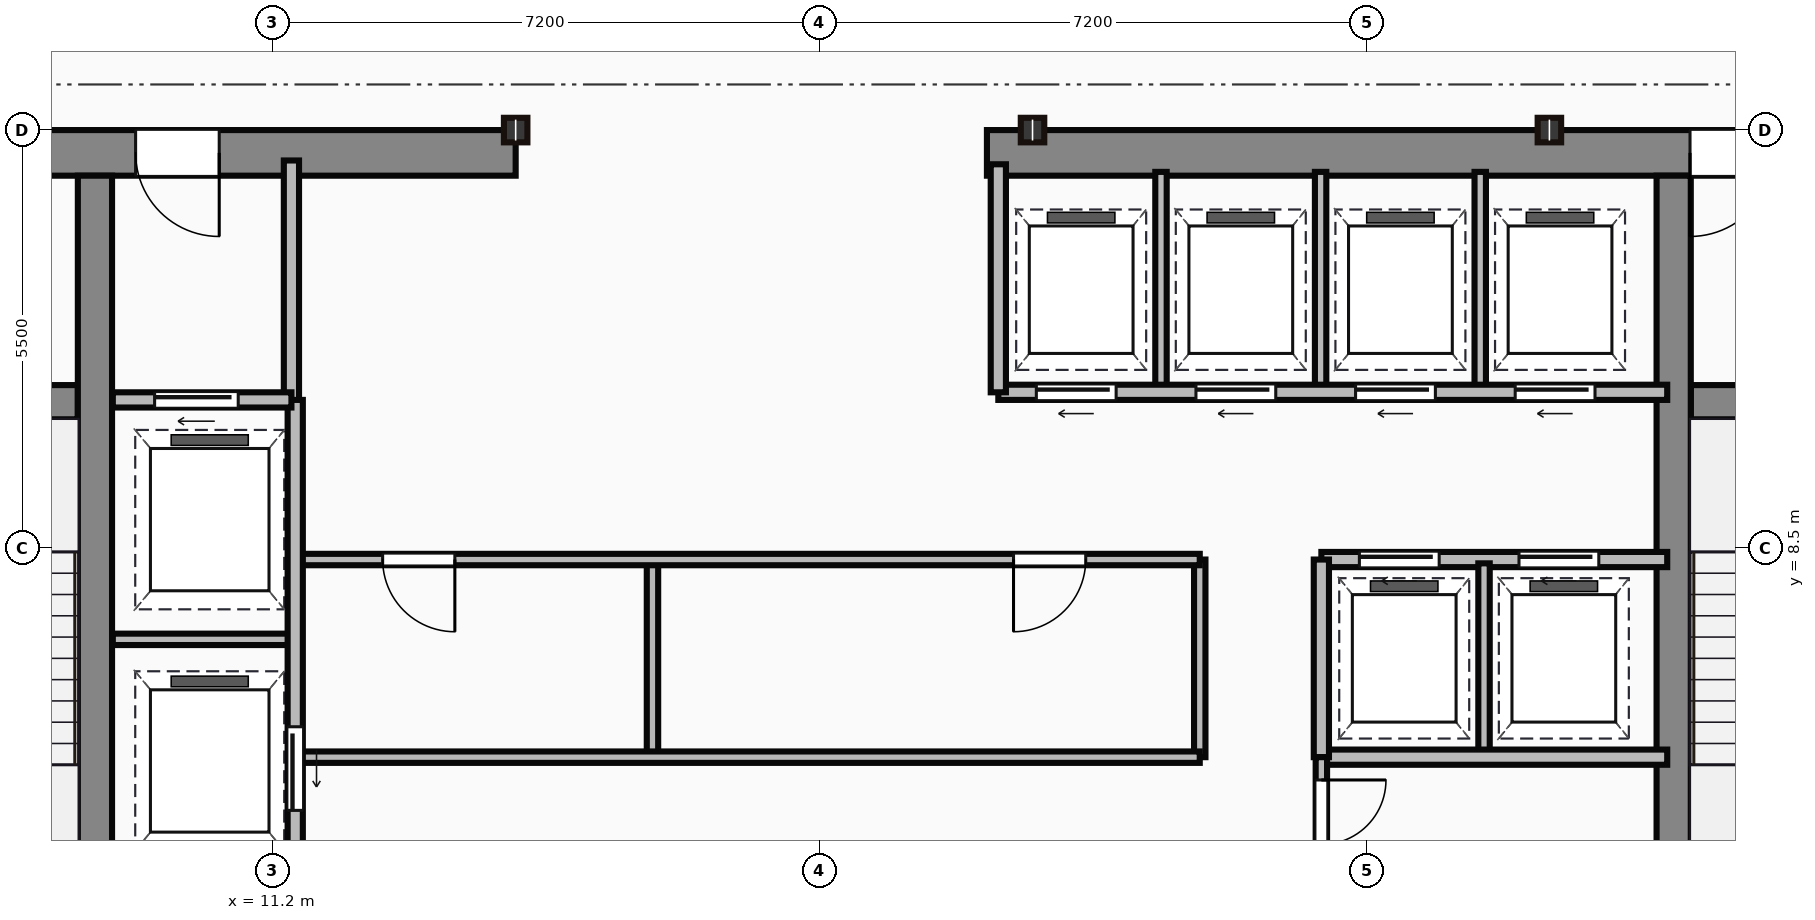
"""IFC4 building model, lengths in metres.
Left out: names, types, materials, properties, quantities, classifications, styles, units other than length and angle.
Written with IfcOpenShell. Run it as: python <this file> out.ifc"""

import sys

from ifc_helpers import new_model, si_unit, direction, frame, frame_2d, origin, origin_2d, place, context, subcontext, project, spatial, rectangle, i_section, extrude, source, transform, mapped, element, fill, save


model = new_model("IFC4")
c1 = context("Model", 3, precision=1e-05, world=origin(), true_north=direction((0.0, 1.0)))
c2 = subcontext(c1, "Body", "Model", "MODEL_VIEW")
j1 = project(units=[si_unit("LENGTHUNIT", "METRE"), si_unit("PLANEANGLEUNIT", "RADIAN")], contexts=[c1])
p1 = place(None, origin())
s1 = spatial("IfcSite", under=j1, at=p1, CompositionType="ELEMENT")
p2 = place(p1, origin())
s2 = spatial("IfcBuilding", under=s1, at=p2, CompositionType="ELEMENT")
p3 = place(p2, frame((0.0, 0.0, 214.15)))
s3 = spatial("IfcBuildingStorey", under=s2, at=p3, CompositionType="ELEMENT", Elevation=214.15)
m1 = source(origin(), c2, "Body", "SweptSolid", [
    extrude(rectangle(XDim=9.1, YDim=0.6, at=frame_2d((4.55, 0.0))), origin(), (0.0, 0.0, 1.0), 3.65),
])
p4 = place(p3, frame((5.3, 13.7, 0.0), z_axis=(0.0, 0.0, 1.0), x_axis=(1.0, 0.0, 0.0)))
e1 = element("IfcWall", 1, at=p4, inside=s3, PredefinedType="SHEAR", context=c2, shape_type="MappedRepresentation", body=[
    mapped(m1, transform((0.0, 0.0, 0.0))),
])
p5 = place(p4, frame((4.1, 0.0, 0.0)))
e2 = element("IfcOpeningElement", 2, at=p5, cuts=e1, PredefinedType="OPENING", context=c2, shape_type="SweptSolid", body=[
    extrude(rectangle(XDim=1.1, YDim=2.15, at=frame_2d((0.55, 1.075))), frame((0.0, 0.31, 0.0), z_axis=(0.0, -1.0, 0.0), x_axis=(1.0, 0.0, 0.0)), (0.0, 0.0, 1.0), 0.62),
])
m2 = source(origin(), c2, "Body", "SweptSolid", [
    extrude(rectangle(XDim=12.6, YDim=0.6, at=frame_2d((6.3, 0.0))), origin(), (0.0, 0.0, 1.0), 3.65),
])
p6 = place(p3, frame((20.6, 13.7, 0.0), z_axis=(0.0, 0.0, 1.0), x_axis=(1.0, 0.0, 0.0)))
e3 = element("IfcWall", 3, at=p6, inside=s3, PredefinedType="SHEAR", context=c2, shape_type="MappedRepresentation", body=[
    mapped(m2, transform((0.0, 0.0, 0.0))),
])
p7 = place(p6, frame((9.25, 0.0, 0.0)))
e4 = element("IfcOpeningElement", 4, at=p7, cuts=e3, PredefinedType="OPENING", context=c2, shape_type="SweptSolid", body=[
    extrude(rectangle(XDim=1.1, YDim=2.15, at=frame_2d((0.55, 1.075))), frame((0.0, 0.31, 0.0), z_axis=(0.0, -1.0, 0.0), x_axis=(1.0, 0.0, 0.0)), (0.0, 0.0, 1.0), 0.62),
])
m3 = source(origin(), c2, "Body", "SweptSolid", [
    extrude(rectangle(XDim=12.5, YDim=0.45, at=frame_2d((6.25, 0.0))), origin(), (0.0, 0.0, 1.0), 3.65),
])
for number, where, z_axis, x_axis in (
    (5, (8.865, 0.9, 0.0), (0.0, 0.0, 1.0), (0.0, 1.0, 0.0)),
    (6, (29.635, 0.9, 0.0), (0.0, 0.0, 1.0), (0.0, 1.0, 0.0)),
):
    element("IfcWall", number, at=place(p3, frame(where, z_axis=z_axis, x_axis=x_axis)), inside=s3, PredefinedType="SHEAR", context=c2, shape_type="MappedRepresentation", body=[
        mapped(m3, transform((0.0, 0.0, 0.0))),
    ])
m4 = source(origin(), c2, "Body", "SweptSolid", [
    extrude(rectangle(XDim=3.39, YDim=0.45, at=frame_2d((1.695, 0.0))), origin(), (0.0, 0.0, 1.0), 3.65),
])
p8 = place(p3, frame((5.25, 10.42, 0.0), z_axis=(0.0, 0.0, 1.0), x_axis=(1.0, 0.0, 0.0)))
e7 = element("IfcWall", 7, at=p8, inside=s3, PredefinedType="SHEAR", context=c2, shape_type="MappedRepresentation", body=[
    mapped(m4, transform((0.0, 0.0, 0.0))),
])
p9 = place(p8, frame((1.05, 0.0, 0.0)))
e8 = element("IfcOpeningElement", 8, at=p9, cuts=e7, PredefinedType="OPENING", context=c2, shape_type="SweptSolid", body=[
    extrude(rectangle(XDim=1.1, YDim=2.15, at=frame_2d((0.55, 1.075))), frame((0.0, 0.235, 0.0), z_axis=(0.0, -1.0, 0.0), x_axis=(1.0, 0.0, 0.0)), (0.0, 0.0, 1.0), 0.47),
])
p10 = place(p3, frame((29.86, 10.42, 0.0), z_axis=(0.0, 0.0, 1.0), x_axis=(1.0, 0.0, 0.0)))
e9 = element("IfcWall", 9, at=p10, inside=s3, PredefinedType="SHEAR", context=c2, shape_type="MappedRepresentation", body=[
    mapped(m4, transform((0.0, 0.0, 0.0))),
])
p11 = place(p10, frame((1.1, 0.0, 0.0)))
e10 = element("IfcOpeningElement", 10, at=p11, cuts=e9, PredefinedType="OPENING", context=c2, shape_type="SweptSolid", body=[
    extrude(rectangle(XDim=1.1, YDim=2.15, at=frame_2d((0.55, 1.075))), frame((0.0, 0.235, 0.0), z_axis=(0.0, -1.0, 0.0), x_axis=(1.0, 0.0, 0.0)), (0.0, 0.0, 1.0), 0.47),
])
m5 = source(origin(), c2, "Body", "SweptSolid", [
    extrude(i_section(OverallWidth=0.309, OverallDepth=0.323, WebThickness=0.014, FlangeThickness=0.023, at=origin_2d()), origin(), (0.0, 0.0, 1.0), 3.65),
])
for number, where, z_axis, x_axis in (
    (11, (14.4, 14.0, 0.0), (0.0, 0.0, 1.0), (1.0, 0.0, 0.0)),
    (12, (21.2, 14.0, 0.0), (0.0, 0.0, 1.0), (1.0, 0.0, 0.0)),
    (13, (28.0, 14.0, 0.0), (0.0, 0.0, 1.0), (1.0, 0.0, 0.0)),
):
    element("IfcColumn", number, at=place(p3, frame(where, z_axis=z_axis, x_axis=x_axis)), inside=s3, PredefinedType="COLUMN", context=c2, shape_type="MappedRepresentation", body=[
        mapped(m5, transform((0.0, 0.0, 0.0))),
    ])
m6 = source(origin(), c2, "Body", "SweptSolid", [
    extrude(rectangle(XDim=3.18, YDim=0.2, at=frame_2d((1.59, 0.0))), origin(), (0.0, 0.0, 1.0), 3.4),
])
p12 = place(p3, frame((11.45, 10.42, 0.0), z_axis=(0.0, 0.0, 1.0), x_axis=(0.0, 1.0, 0.0)))
e14 = element("IfcWall", 14, at=p12, inside=s3, PredefinedType="PARTITIONING", context=c2, shape_type="MappedRepresentation", body=[
    mapped(m6, transform((0.0, 0.0, 0.0))),
])
m7 = source(origin(), c2, "Body", "SweptSolid", [
    extrude(rectangle(XDim=2.35, YDim=0.2, at=frame_2d((1.175, 0.0))), origin(), (0.0, 0.0, 1.0), 3.4),
])
p13 = place(p3, frame((9.1, 10.45, 0.0), z_axis=(0.0, 0.0, 1.0), x_axis=(1.0, 0.0, 0.0)))
e15 = element("IfcWall", 15, at=p13, inside=s3, PredefinedType="PARTITIONING", context=c2, shape_type="MappedRepresentation", body=[
    mapped(m7, transform((0.0, 0.0, 0.0))),
])
p14 = place(p13, frame((0.55, 0.0, 0.0)))
e16 = element("IfcOpeningElement", 16, at=p14, cuts=e15, PredefinedType="OPENING", context=c2, shape_type="SweptSolid", body=[
    extrude(rectangle(XDim=1.1, YDim=2.15, at=frame_2d((0.55, 1.075))), frame((0.0, 0.11, 0.0), z_axis=(0.0, -1.0, 0.0), x_axis=(1.0, 0.0, 0.0)), (0.0, 0.0, 1.0), 0.22),
])
m8 = source(origin(), c2, "Body", "SweptSolid", [
    extrude(rectangle(XDim=9.6, YDim=0.2, at=frame_2d((4.8, 0.0))), origin(), (0.0, 0.0, 1.0), 3.4),
])
p15 = place(p3, frame((11.5, 0.85, 0.0), z_axis=(0.0, 0.0, 1.0), x_axis=(0.0, 1.0, 0.0)))
e17 = element("IfcWall", 17, at=p15, inside=s3, PredefinedType="PARTITIONING", context=c2, shape_type="MappedRepresentation", body=[
    mapped(m8, transform((0.0, 0.0, 0.0))),
])
p16 = place(p15, frame((4.2, 0.0, 0.0)))
e18 = element("IfcOpeningElement", 18, at=p16, cuts=e17, PredefinedType="OPENING", context=c2, shape_type="SweptSolid", body=[
    extrude(rectangle(XDim=1.1, YDim=2.15, at=frame_2d((0.55, 1.075))), frame((0.0, 0.11, 0.0), z_axis=(0.0, -1.0, 0.0), x_axis=(1.0, 0.0, 0.0)), (0.0, 0.0, 1.0), 0.22),
])
p17 = place(p15, frame((0.9, 0.0, 0.0)))
e19 = element("IfcOpeningElement", 19, at=p17, cuts=e17, PredefinedType="OPENING", context=c2, shape_type="SweptSolid", body=[
    extrude(rectangle(XDim=1.2, YDim=2.15, at=frame_2d((0.6, 1.075))), frame((0.0, 0.11, 0.0), z_axis=(0.0, -1.0, 0.0), x_axis=(1.0, 0.0, 0.0)), (0.0, 0.0, 1.0), 0.22),
])
m9 = source(origin(), c2, "Body", "SweptSolid", [
    extrude(rectangle(XDim=2.4, YDim=0.15, at=frame_2d((1.2, 0.0))), origin(), (0.0, 0.0, 1.0), 3.4),
])
p18 = place(p3, frame((9.1, 7.3, 0.0), z_axis=(0.0, 0.0, 1.0), x_axis=(1.0, 0.0, 0.0)))
e20 = element("IfcWall", 20, at=p18, inside=s3, PredefinedType="PARTITIONING", context=c2, shape_type="MappedRepresentation", body=[
    mapped(m9, transform((0.0, 0.0, 0.0))),
])
m10 = source(origin(), c2, "Body", "SweptSolid", [
    extrude(rectangle(XDim=11.85, YDim=0.15, at=frame_2d((5.925, 0.0))), origin(), (0.0, 0.0, 1.0), 3.4),
])
p19 = place(p3, frame((11.55, 5.75, 0.0), z_axis=(0.0, 0.0, 1.0), x_axis=(1.0, 0.0, 0.0)))
e21 = element("IfcWall", 21, at=p19, inside=s3, PredefinedType="PARTITIONING", context=c2, shape_type="MappedRepresentation", body=[
    mapped(m10, transform((0.0, 0.0, 0.0))),
])
p20 = place(p3, frame((11.55, 8.35, 0.0), z_axis=(0.0, 0.0, 1.0), x_axis=(1.0, 0.0, 0.0)))
e22 = element("IfcWall", 22, at=p20, inside=s3, PredefinedType="PARTITIONING", context=c2, shape_type="MappedRepresentation", body=[
    mapped(m10, transform((0.0, 0.0, 0.0))),
])
p21 = place(p20, frame((1.1, 0.0, 0.0)))
e23 = element("IfcOpeningElement", 23, at=p21, cuts=e22, PredefinedType="OPENING", context=c2, shape_type="SweptSolid", body=[
    extrude(rectangle(XDim=0.95, YDim=2.15, at=frame_2d((0.475, 1.075))), frame((0.0, 0.085, 0.0), z_axis=(0.0, -1.0, 0.0), x_axis=(1.0, 0.0, 0.0)), (0.0, 0.0, 1.0), 0.17),
])
p22 = place(p20, frame((9.4, 0.0, 0.0)))
e24 = element("IfcOpeningElement", 24, at=p22, cuts=e22, PredefinedType="OPENING", context=c2, shape_type="SweptSolid", body=[
    extrude(rectangle(XDim=0.95, YDim=2.15, at=frame_2d((0.475, 1.075))), frame((0.0, 0.085, 0.0), z_axis=(0.0, -1.0, 0.0), x_axis=(1.0, 0.0, 0.0)), (0.0, 0.0, 1.0), 0.17),
])
m11 = source(origin(), c2, "Body", "SweptSolid", [
    extrude(rectangle(XDim=2.6, YDim=0.15, at=frame_2d((1.3, 0.0))), origin(), (0.0, 0.0, 1.0), 3.4),
])
p23 = place(p3, frame((23.4, 5.75, 0.0), z_axis=(0.0, 0.0, 1.0), x_axis=(0.0, 1.0, 0.0)))
e25 = element("IfcWall", 25, at=p23, inside=s3, PredefinedType="PARTITIONING", context=c2, shape_type="MappedRepresentation", body=[
    mapped(m11, transform((0.0, 0.0, 0.0))),
])
m12 = source(origin(), c2, "Body", "SweptSolid", [
    extrude(rectangle(XDim=2.5, YDim=0.15, at=frame_2d((1.25, 0.0))), origin(), (0.0, 0.0, 1.0), 3.4),
])
p24 = place(p3, frame((16.2, 5.8, 0.0), z_axis=(0.0, 0.0, 1.0), x_axis=(0.0, 1.0, 0.0)))
e26 = element("IfcWall", 26, at=p24, inside=s3, PredefinedType="PARTITIONING", context=c2, shape_type="MappedRepresentation", body=[
    mapped(m12, transform((0.0, 0.0, 0.0))),
])
m13 = source(origin(), c2, "Body", "SweptSolid", [
    extrude(rectangle(XDim=8.8, YDim=0.2, at=frame_2d((4.4, 0.0))), origin(), (0.0, 0.0, 1.0), 3.4),
])
p25 = place(p3, frame((20.75, 10.55, 0.0), z_axis=(0.0, 0.0, 1.0), x_axis=(1.0, 0.0, 0.0)))
e27 = element("IfcWall", 27, at=p25, inside=s3, PredefinedType="PARTITIONING", context=c2, shape_type="MappedRepresentation", body=[
    mapped(m13, transform((0.0, 0.0, 0.0))),
])
p26 = place(p25, frame((0.5, 0.0, 0.0)))
e28 = element("IfcOpeningElement", 28, at=p26, cuts=e27, PredefinedType="OPENING", context=c2, shape_type="SweptSolid", body=[
    extrude(rectangle(XDim=1.05, YDim=2.15, at=frame_2d((0.525, 1.075))), frame((0.0, 0.11, 0.0), z_axis=(0.0, -1.0, 0.0), x_axis=(1.0, 0.0, 0.0)), (0.0, 0.0, 1.0), 0.22),
])
p27 = place(p25, frame((2.6, 0.0, 0.0)))
e29 = element("IfcOpeningElement", 29, at=p27, cuts=e27, PredefinedType="OPENING", context=c2, shape_type="SweptSolid", body=[
    extrude(rectangle(XDim=1.05, YDim=2.15, at=frame_2d((0.525, 1.075))), frame((0.0, 0.11, 0.0), z_axis=(0.0, -1.0, 0.0), x_axis=(1.0, 0.0, 0.0)), (0.0, 0.0, 1.0), 0.22),
])
p28 = place(p25, frame((4.7, 0.0, 0.0)))
e30 = element("IfcOpeningElement", 30, at=p28, cuts=e27, PredefinedType="OPENING", context=c2, shape_type="SweptSolid", body=[
    extrude(rectangle(XDim=1.05, YDim=2.15, at=frame_2d((0.525, 1.075))), frame((0.0, 0.11, 0.0), z_axis=(0.0, -1.0, 0.0), x_axis=(1.0, 0.0, 0.0)), (0.0, 0.0, 1.0), 0.22),
])
p29 = place(p25, frame((6.8, 0.0, 0.0)))
e31 = element("IfcOpeningElement", 31, at=p29, cuts=e27, PredefinedType="OPENING", context=c2, shape_type="SweptSolid", body=[
    extrude(rectangle(XDim=1.05, YDim=2.15, at=frame_2d((0.525, 1.075))), frame((0.0, 0.11, 0.0), z_axis=(0.0, -1.0, 0.0), x_axis=(1.0, 0.0, 0.0)), (0.0, 0.0, 1.0), 0.22),
])
m14 = source(origin(), c2, "Body", "SweptSolid", [
    extrude(rectangle(XDim=3.0, YDim=0.2, at=frame_2d((1.5, 0.0))), origin(), (0.0, 0.0, 1.0), 3.4),
])
p30 = place(p3, frame((20.75, 10.55, 0.0), z_axis=(0.0, 0.0, 1.0), x_axis=(0.0, 1.0, 0.0)))
e32 = element("IfcWall", 32, at=p30, inside=s3, PredefinedType="PARTITIONING", context=c2, shape_type="MappedRepresentation", body=[
    mapped(m14, transform((0.0, 0.0, 0.0))),
])
m15 = source(origin(), c2, "Body", "SweptSolid", [
    extrude(rectangle(XDim=2.85, YDim=0.15, at=frame_2d((1.425, 0.0))), origin(), (0.0, 0.0, 1.0), 3.4),
])
for number, where, z_axis, x_axis in (
    (33, (22.89, 10.6, 0.0), (0.0, 0.0, 1.0), (0.0, 1.0, 0.0)),
    (34, (24.99, 10.6, 0.0), (0.0, 0.0, 1.0), (0.0, 1.0, 0.0)),
    (35, (27.09, 10.6, 0.0), (0.0, 0.0, 1.0), (0.0, 1.0, 0.0)),
):
    element("IfcWall", number, at=place(p3, frame(where, z_axis=z_axis, x_axis=x_axis)), inside=s3, PredefinedType="PARTITIONING", context=c2, shape_type="MappedRepresentation", body=[
        mapped(m15, transform((0.0, 0.0, 0.0))),
    ])
m16 = source(origin(), c2, "Body", "SweptSolid", [
    extrude(rectangle(XDim=4.55, YDim=0.2, at=frame_2d((2.275, 0.0))), origin(), (0.0, 0.0, 1.0), 3.4),
])
p31 = place(p3, frame((25.0, 8.35, 0.0), z_axis=(0.0, 0.0, 1.0), x_axis=(1.0, 0.0, 0.0)))
e36 = element("IfcWall", 36, at=p31, inside=s3, PredefinedType="PARTITIONING", context=c2, shape_type="MappedRepresentation", body=[
    mapped(m16, transform((0.0, 0.0, 0.0))),
])
p32 = place(p31, frame((0.5, 0.0, 0.0)))
e37 = element("IfcOpeningElement", 37, at=p32, cuts=e36, PredefinedType="OPENING", context=c2, shape_type="SweptSolid", body=[
    extrude(rectangle(XDim=1.05, YDim=2.15, at=frame_2d((0.525, 1.075))), frame((0.0, 0.11, 0.0), z_axis=(0.0, -1.0, 0.0), x_axis=(1.0, 0.0, 0.0)), (0.0, 0.0, 1.0), 0.22),
])
p33 = place(p31, frame((2.6, 0.0, 0.0)))
e38 = element("IfcOpeningElement", 38, at=p33, cuts=e36, PredefinedType="OPENING", context=c2, shape_type="SweptSolid", body=[
    extrude(rectangle(XDim=1.05, YDim=2.15, at=frame_2d((0.525, 1.075))), frame((0.0, 0.11, 0.0), z_axis=(0.0, -1.0, 0.0), x_axis=(1.0, 0.0, 0.0)), (0.0, 0.0, 1.0), 0.22),
])
p34 = place(p3, frame((25.0, 5.75, 0.0), z_axis=(0.0, 0.0, 1.0), x_axis=(1.0, 0.0, 0.0)))
e39 = element("IfcWall", 39, at=p34, inside=s3, PredefinedType="PARTITIONING", context=c2, shape_type="MappedRepresentation", body=[
    mapped(m16, transform((0.0, 0.0, 0.0))),
])
m17 = source(origin(), c2, "Body", "SweptSolid", [
    extrude(rectangle(XDim=2.6, YDim=0.2, at=frame_2d((1.3, 0.0))), origin(), (0.0, 0.0, 1.0), 3.4),
])
p35 = place(p3, frame((25.0, 5.75, 0.0), z_axis=(0.0, 0.0, 1.0), x_axis=(0.0, 1.0, 0.0)))
e40 = element("IfcWall", 40, at=p35, inside=s3, PredefinedType="PARTITIONING", context=c2, shape_type="MappedRepresentation", body=[
    mapped(m17, transform((0.0, 0.0, 0.0))),
])
p36 = place(p3, frame((27.14, 5.8, 0.0), z_axis=(0.0, 0.0, 1.0), x_axis=(0.0, 1.0, 0.0)))
e41 = element("IfcWall", 41, at=p36, inside=s3, PredefinedType="PARTITIONING", context=c2, shape_type="MappedRepresentation", body=[
    mapped(m12, transform((0.0, 0.0, 0.0))),
])
m18 = source(origin(), c2, "Body", "SweptSolid", [
    extrude(rectangle(XDim=4.9, YDim=0.15, at=frame_2d((2.45, 0.0))), origin(), (0.0, 0.0, 1.0), 3.4),
])
p37 = place(p3, frame((25.0, 0.85, 0.0), z_axis=(0.0, 0.0, 1.0), x_axis=(0.0, 1.0, 0.0)))
e42 = element("IfcWall", 42, at=p37, inside=s3, PredefinedType="PARTITIONING", context=c2, shape_type="MappedRepresentation", body=[
    mapped(m18, transform((0.0, 0.0, 0.0))),
])
p38 = place(p37, frame((2.0, 0.0, 0.0)))
e43 = element("IfcOpeningElement", 43, at=p38, cuts=e42, PredefinedType="OPENING", context=c2, shape_type="SweptSolid", body=[
    extrude(rectangle(XDim=0.95, YDim=2.15, at=frame_2d((0.475, 1.075))), frame((0.0, 0.085, 0.0), z_axis=(0.0, -1.0, 0.0), x_axis=(1.0, 0.0, 0.0)), (0.0, 0.0, 1.0), 0.17),
])
p39 = place(p37, frame((3.75, 0.0, 0.0)))
e44 = element("IfcOpeningElement", 44, at=p39, cuts=e42, PredefinedType="OPENING", context=c2, shape_type="SweptSolid", body=[
    extrude(rectangle(XDim=0.85, YDim=2.15, at=frame_2d((0.425, 1.075))), frame((0.0, 0.085, 0.0), z_axis=(0.0, -1.0, 0.0), x_axis=(1.0, 0.0, 0.0)), (0.0, 0.0, 1.0), 0.17),
])
m19 = source(origin(), c2, "Body", "SweptSolid", [
    extrude(rectangle(XDim=1.1, YDim=2.15, at=frame_2d((0.55, 1.075))), frame((0.0, 0.025, 0.0), z_axis=(0.0, -1.0, 0.0), x_axis=(1.0, 0.0, 0.0)), (0.0, 0.0, 1.0), 0.05),
])
p40 = place(p5, origin())
e45 = element("IfcDoor", 45, at=p40, inside=s3, OperationType="SINGLE_SWING_RIGHT", PredefinedType="DOOR", context=c2, shape_type="MappedRepresentation", body=[
    mapped(m19, transform((0.0, 0.0, 0.0))),
])
fill(e2, e45)
p41 = place(p7, origin())
e46 = element("IfcDoor", 46, at=p41, inside=s3, OperationType="SINGLE_SWING_LEFT", PredefinedType="DOOR", context=c2, shape_type="MappedRepresentation", body=[
    mapped(m19, transform((0.0, 0.0, 0.0))),
])
fill(e4, e46)
p42 = place(p14, origin())
e47 = element("IfcDoor", 47, at=p42, inside=s3, OperationType="SLIDING_TO_LEFT", PredefinedType="DOOR", context=c2, shape_type="MappedRepresentation", body=[
    mapped(m19, transform((0.0, 0.0, 0.0))),
])
fill(e16, e47)
p43 = place(p16, frame((1.1, 0.0, 0.0), z_axis=(0.0, 0.0, 1.0), x_axis=(-1.0, 0.0, 0.0)))
e48 = element("IfcDoor", 48, at=p43, inside=s3, OperationType="SLIDING_TO_LEFT", PredefinedType="DOOR", context=c2, shape_type="MappedRepresentation", body=[
    mapped(m19, transform((0.0, 0.0, 0.0))),
])
fill(e18, e48)
m20 = source(origin(), c2, "Body", "SweptSolid", [
    extrude(rectangle(XDim=0.95, YDim=2.15, at=frame_2d((0.475, 1.075))), frame((0.0, 0.025, 0.0), z_axis=(0.0, -1.0, 0.0), x_axis=(1.0, 0.0, 0.0)), (0.0, 0.0, 1.0), 0.05),
])
p44 = place(p21, origin())
e49 = element("IfcDoor", 49, at=p44, inside=s3, OperationType="SINGLE_SWING_RIGHT", PredefinedType="DOOR", context=c2, shape_type="MappedRepresentation", body=[
    mapped(m20, transform((0.0, 0.0, 0.0))),
])
fill(e23, e49)
p45 = place(p22, origin())
e50 = element("IfcDoor", 50, at=p45, inside=s3, OperationType="SINGLE_SWING_LEFT", PredefinedType="DOOR", context=c2, shape_type="MappedRepresentation", body=[
    mapped(m20, transform((0.0, 0.0, 0.0))),
])
fill(e24, e50)
m21 = source(origin(), c2, "Body", "SweptSolid", [
    extrude(rectangle(XDim=1.05, YDim=2.15, at=frame_2d((0.525, 1.075))), frame((0.0, 0.025, 0.0), z_axis=(0.0, -1.0, 0.0), x_axis=(1.0, 0.0, 0.0)), (0.0, 0.0, 1.0), 0.05),
])
p46 = place(p26, frame((1.05, 0.0, 0.0), z_axis=(0.0, 0.0, 1.0), x_axis=(-1.0, 0.0, 0.0)))
e51 = element("IfcDoor", 51, at=p46, inside=s3, OperationType="SLIDING_TO_LEFT", PredefinedType="DOOR", context=c2, shape_type="MappedRepresentation", body=[
    mapped(m21, transform((0.0, 0.0, 0.0))),
])
fill(e28, e51)
p47 = place(p27, frame((1.05, 0.0, 0.0), z_axis=(0.0, 0.0, 1.0), x_axis=(-1.0, 0.0, 0.0)))
e52 = element("IfcDoor", 52, at=p47, inside=s3, OperationType="SLIDING_TO_LEFT", PredefinedType="DOOR", context=c2, shape_type="MappedRepresentation", body=[
    mapped(m21, transform((0.0, 0.0, 0.0))),
])
fill(e29, e52)
p48 = place(p28, frame((1.05, 0.0, 0.0), z_axis=(0.0, 0.0, 1.0), x_axis=(-1.0, 0.0, 0.0)))
e53 = element("IfcDoor", 53, at=p48, inside=s3, OperationType="SLIDING_TO_LEFT", PredefinedType="DOOR", context=c2, shape_type="MappedRepresentation", body=[
    mapped(m21, transform((0.0, 0.0, 0.0))),
])
fill(e30, e53)
p49 = place(p29, frame((1.05, 0.0, 0.0), z_axis=(0.0, 0.0, 1.0), x_axis=(-1.0, 0.0, 0.0)))
e54 = element("IfcDoor", 54, at=p49, inside=s3, OperationType="SLIDING_TO_LEFT", PredefinedType="DOOR", context=c2, shape_type="MappedRepresentation", body=[
    mapped(m21, transform((0.0, 0.0, 0.0))),
])
fill(e31, e54)
p50 = place(p32, origin())
e55 = element("IfcDoor", 55, at=p50, inside=s3, OperationType="SLIDING_TO_LEFT", PredefinedType="DOOR", context=c2, shape_type="MappedRepresentation", body=[
    mapped(m21, transform((0.0, 0.0, 0.0))),
])
fill(e37, e55)
p51 = place(p33, origin())
e56 = element("IfcDoor", 56, at=p51, inside=s3, OperationType="SLIDING_TO_LEFT", PredefinedType="DOOR", context=c2, shape_type="MappedRepresentation", body=[
    mapped(m21, transform((0.0, 0.0, 0.0))),
])
fill(e38, e56)
m22 = source(origin(), c2, "Body", "SweptSolid", [
    extrude(rectangle(XDim=0.85, YDim=2.15, at=frame_2d((0.425, 1.075))), frame((0.0, 0.025, 0.0), z_axis=(0.0, -1.0, 0.0), x_axis=(1.0, 0.0, 0.0)), (0.0, 0.0, 1.0), 0.05),
])
p52 = place(p39, origin())
e57 = element("IfcDoor", 57, at=p52, inside=s3, OperationType="SINGLE_SWING_RIGHT", PredefinedType="DOOR", context=c2, shape_type="MappedRepresentation", body=[
    mapped(m22, transform((0.0, 0.0, 0.0))),
])
fill(e44, e57)
save(model, sys.argv[1])
